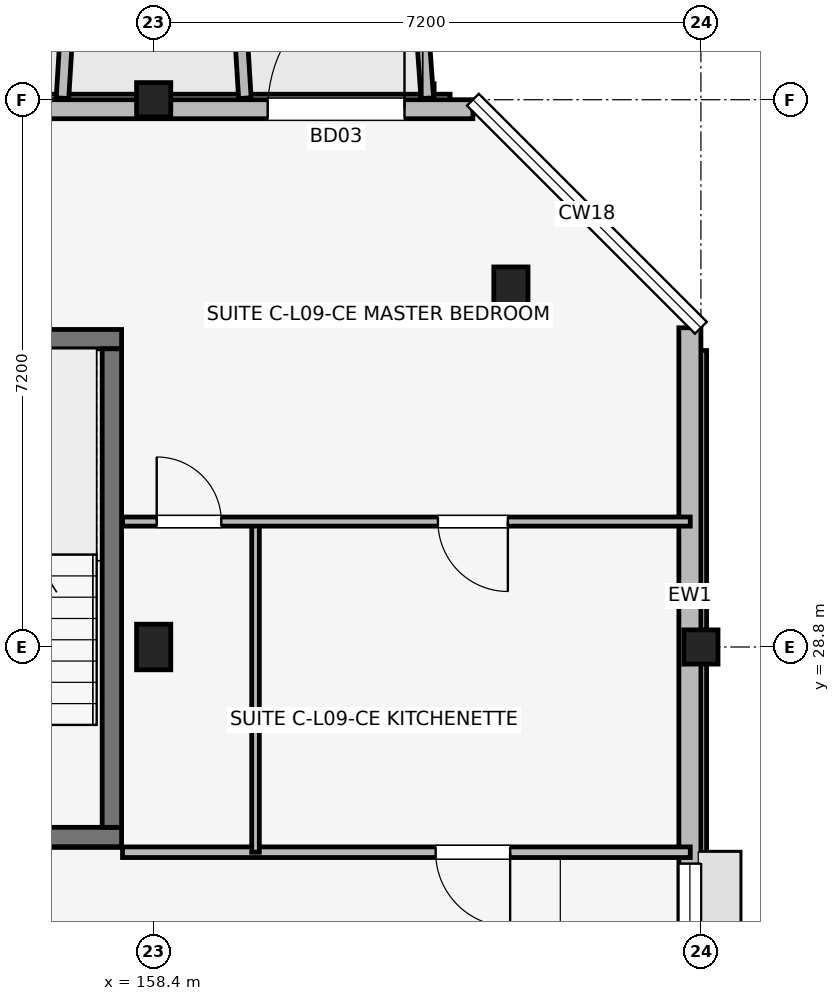
"""IFC4 building model, lengths in metres.
Left out: names, types, materials, properties, quantities, classifications, styles, units other than length and angle.
Written with IfcOpenShell. Run it as: python <this file> out.ifc"""

import sys

from ifc_helpers import new_model, si_unit, direction, frame, frame_2d, origin, origin_2d, place, context, subcontext, project, spatial, rectangle, extrude, element, fill, save


model = new_model("IFC4")
c1 = context("Model", 3, precision=1e-05, world=origin(), true_north=direction((0.0, 1.0)))
c2 = subcontext(c1, "Body", "Model", "MODEL_VIEW")
j1 = project(units=[si_unit("LENGTHUNIT", "METRE"), si_unit("PLANEANGLEUNIT", "RADIAN")], contexts=[c1])
p1 = place(None, origin())
s1 = spatial("IfcSite", under=j1, at=p1, CompositionType="ELEMENT")
p2 = place(p1, origin())
s2 = spatial("IfcBuilding", under=s1, at=p2, CompositionType="ELEMENT")
p3 = place(p2, frame((0.0, 0.0, 30.75)))
s3 = spatial("IfcBuildingStorey", under=s2, at=p3, CompositionType="ELEMENT", Elevation=30.75)
p4 = place(p3, frame((158.4, 28.8, 0.0), z_axis=(0.0, 0.0, 1.0), x_axis=(1.0, 0.0, 0.0)))
e1 = element("IfcColumn", 1, at=p4, inside=s3, PredefinedType="COLUMN", context=c2, shape_type="SweptSolid", body=[
    extrude(rectangle(XDim=0.45, YDim=0.6, at=origin_2d()), origin(), (0.0, 0.0, 1.0), 3.15),
])
for number, where, z_axis, x_axis in (
    (2, (158.4, 36.0, 0.0), (0.0, 0.0, 1.0), (1.0, 0.0, 0.0)),
    (3, (165.6, 28.8, 0.0), (0.0, 0.0, 1.0), (1.0, 0.0, 0.0)),
):
    element("IfcColumn", number, at=place(p3, frame(where, z_axis=z_axis, x_axis=x_axis)), inside=s3, PredefinedType="COLUMN", context=c2, shape_type="SweptSolid", body=[
        extrude(rectangle(XDim=0.45, YDim=0.45, at=origin_2d()), origin(), (0.0, 0.0, 1.0), 3.15),
    ])
p5 = place(p3, frame((163.1, 33.5, 0.0), z_axis=(0.0, 0.0, 1.0), x_axis=(1.0, 0.0, 0.0)))
e4 = element("IfcColumn", 4, at=p5, inside=s3, PredefinedType="COLUMN", context=c2, shape_type="SweptSolid", body=[
    extrude(rectangle(XDim=0.45, YDim=0.6, at=origin_2d()), origin(), (0.0, 0.0, 1.0), 3.15),
])
p6 = place(p3, frame((154.673, 26.3, 0.0), z_axis=(0.0, 0.0, 1.0), x_axis=(1.0, 0.0, 0.0)))
e5 = element("IfcWall", 5, at=p6, inside=s3, PredefinedType="SHEAR", context=c2, shape_type="SweptSolid", body=[
    extrude(rectangle(XDim=3.305, YDim=0.255, at=frame_2d((1.652, 0.0))), origin(), (0.0, 0.0, 1.0), 3.15),
])
p7 = place(p6, frame((1.127, 0.0, 0.0)))
e6 = element("IfcOpeningElement", 6, at=p7, cuts=e5, PredefinedType="OPENING", context=c2, shape_type="SweptSolid", body=[
    extrude(rectangle(XDim=1.05, YDim=2.12, at=frame_2d((0.525, 1.06))), frame((0.0, 0.137, 0.0), z_axis=(0.0, -1.0, 0.0), x_axis=(1.0, 0.0, 0.0)), (0.0, 0.0, 1.0), 0.275),
])
p8 = place(p3, frame((154.673, 32.85, 0.0), z_axis=(0.0, 0.0, 1.0), x_axis=(1.0, 0.0, 0.0)))
e7 = element("IfcWall", 7, at=p8, inside=s3, PredefinedType="SHEAR", context=c2, shape_type="SweptSolid", body=[
    extrude(rectangle(XDim=3.305, YDim=0.255, at=frame_2d((1.652, 0.0))), origin(), (0.0, 0.0, 1.0), 3.15),
])
p9 = place(p3, frame((157.85, 26.427, 0.0), z_axis=(0.0, 0.0, 1.0), x_axis=(0.0, 1.0, 0.0)))
e8 = element("IfcWall", 8, at=p9, inside=s3, PredefinedType="SHEAR", context=c2, shape_type="SweptSolid", body=[
    extrude(rectangle(XDim=6.295, YDim=0.255, at=frame_2d((3.147, 0.0))), origin(), (0.0, 0.0, 1.0), 3.15),
])
p10 = place(p3, frame((165.455, 17.4, 0.0), z_axis=(0.0, 0.0, 1.0), x_axis=(0.0, 1.0, 0.0)))
e9 = element("IfcWall", 9, at=p10, inside=s3, PredefinedType="SOLIDWALL", context=c2, shape_type="SweptSolid", body=[
    extrude(rectangle(XDim=15.6, YDim=0.29, at=frame_2d((7.8, 0.0))), origin(), (0.0, 0.0, 1.0), 2.48),
])
p11 = place(p10, frame((7.05, 0.0, 1.05)))
e10 = element("IfcOpeningElement", 10, at=p11, cuts=e9, PredefinedType="OPENING", context=c2, shape_type="SweptSolid", body=[
    extrude(rectangle(XDim=1.5, YDim=1.15, at=frame_2d((0.75, 0.575))), frame((0.0, 0.155, 0.0), z_axis=(0.0, -1.0, 0.0), x_axis=(1.0, 0.0, 0.0)), (0.0, 0.0, 1.0), 0.31),
])
p12 = place(p10, frame((1.363, 0.0, 0.75)))
e11 = element("IfcOpeningElement", 11, at=p12, cuts=e9, PredefinedType="OPENING", context=c2, shape_type="SweptSolid", body=[
    extrude(rectangle(XDim=1.42, YDim=1.6, at=frame_2d((0.71, 0.8))), frame((0.0, 0.155, 0.0), z_axis=(0.0, -1.0, 0.0), x_axis=(1.0, 0.0, 0.0)), (0.0, 0.0, 1.0), 0.31),
])
p13 = place(p3, frame((162.6, 35.875, 0.0), z_axis=(0.0, 0.0, 1.0), x_axis=(-1.0, 0.0, 0.0)))
e12 = element("IfcWall", 12, at=p13, inside=s3, PredefinedType="SOLIDWALL", context=c2, shape_type="SweptSolid", body=[
    extrude(rectangle(XDim=30.0, YDim=0.25, at=frame_2d((15.0, 0.0))), origin(), (0.0, 0.0, 1.0), 2.48),
])
p14 = place(p13, frame((29.025, 0.0, 0.0), z_axis=(0.0, 0.0, 1.0), x_axis=(-1.0, 0.0, 0.0)))
e13 = element("IfcOpeningElement", 13, at=p14, cuts=e12, PredefinedType="OPENING", context=c2, shape_type="SweptSolid", body=[
    extrude(rectangle(XDim=1.65, YDim=2.15, at=frame_2d((0.825, 1.075))), frame((0.0, 0.135, 0.0), z_axis=(0.0, -1.0, 0.0), x_axis=(1.0, 0.0, 0.0)), (0.0, 0.0, 1.0), 0.27),
])
p15 = place(p13, frame((2.7, 0.0, 0.0), z_axis=(0.0, 0.0, 1.0), x_axis=(-1.0, 0.0, 0.0)))
e14 = element("IfcOpeningElement", 14, at=p15, cuts=e12, PredefinedType="OPENING", context=c2, shape_type="SweptSolid", body=[
    extrude(rectangle(XDim=1.8, YDim=2.15, at=frame_2d((0.9, 1.075))), frame((0.0, 0.135, 0.0), z_axis=(0.0, -1.0, 0.0), x_axis=(1.0, 0.0, 0.0)), (0.0, 0.0, 1.0), 0.27),
])
p16 = place(p13, frame((15.43, 0.0, 0.5)))
e15 = element("IfcOpeningElement", 15, at=p16, cuts=e12, PredefinedType="OPENING", context=c2, shape_type="SweptSolid", body=[
    extrude(rectangle(XDim=0.75, YDim=1.75, at=frame_2d((0.375, 0.875))), frame((0.0, 0.135, 0.0), z_axis=(0.0, -1.0, 0.0), x_axis=(1.0, 0.0, 0.0)), (0.0, 0.0, 1.0), 0.27),
])
p17 = place(p13, frame((8.075, 0.0, 0.7)))
e16 = element("IfcOpeningElement", 16, at=p17, cuts=e12, PredefinedType="OPENING", context=c2, shape_type="SweptSolid", body=[
    extrude(rectangle(XDim=2.0, YDim=1.65, at=frame_2d((1.0, 0.825))), frame((0.0, 0.135, 0.0), z_axis=(0.0, -1.0, 0.0), x_axis=(1.0, 0.0, 0.0)), (0.0, 0.0, 1.0), 0.27),
])
p18 = place(p13, frame((19.97, 0.0, 0.7)))
e17 = element("IfcOpeningElement", 17, at=p18, cuts=e12, PredefinedType="OPENING", context=c2, shape_type="SweptSolid", body=[
    extrude(rectangle(XDim=1.86, YDim=1.6, at=frame_2d((0.93, 0.8))), frame((0.0, 0.135, 0.0), z_axis=(0.0, -1.0, 0.0), x_axis=(1.0, 0.0, 0.0)), (0.0, 0.0, 1.0), 0.27),
])
p19 = place(p3, frame((157.2, 36.02, 0.0), z_axis=(0.0, 0.0, 1.0), x_axis=(0.061170732449, 0.998127317276, 0.0)))
e18 = element("IfcWall", 18, at=p19, inside=s3, PredefinedType="ELEMENTEDWALL", context=c2, shape_type="SweptSolid", body=[
    extrude(rectangle(XDim=1.964, YDim=0.165, at=frame_2d((0.982, 0.0))), origin(), (0.0, 0.0, 1.0), 2.58),
])
p20 = place(p3, frame((159.6, 36.02, 0.0), z_axis=(0.0, 0.0, 1.0), x_axis=(-0.061170732449, 0.998127317276, 0.0)))
e19 = element("IfcWall", 19, at=p20, inside=s3, PredefinedType="ELEMENTEDWALL", context=c2, shape_type="SweptSolid", body=[
    extrude(rectangle(XDim=1.964, YDim=0.165, at=frame_2d((0.982, 0.0))), origin(), (0.0, 0.0, 1.0), 2.95),
])
p21 = place(p3, frame((162.0, 36.02, 0.0), z_axis=(0.0, 0.0, 1.0), x_axis=(-0.071194071069, 0.997462482625, 0.0)))
e20 = element("IfcWall", 20, at=p21, inside=s3, PredefinedType="ELEMENTEDWALL", context=c2, shape_type="SweptSolid", body=[
    extrude(rectangle(XDim=1.965, YDim=0.165, at=frame_2d((0.982, 0.0))), origin(), (0.0, 0.0, 1.0), 2.95),
])
p22 = place(p3, frame((157.99, 26.1, 0.0), z_axis=(0.0, 0.0, 1.0), x_axis=(1.0, 0.0, 0.0)))
e21 = element("IfcWall", 21, at=p22, inside=s3, PredefinedType="PARTITIONING", context=c2, shape_type="SweptSolid", body=[
    extrude(rectangle(XDim=7.47, YDim=0.14, at=frame_2d((3.735, 0.0))), origin(), (0.0, 0.0, 1.0), 2.38),
])
p23 = place(p22, frame((5.1, 0.0, 0.0), z_axis=(0.0, 0.0, 1.0), x_axis=(-1.0, 0.0, 0.0)))
e22 = element("IfcOpeningElement", 22, at=p23, cuts=e21, PredefinedType="OPENING", context=c2, shape_type="SweptSolid", body=[
    extrude(rectangle(XDim=0.98, YDim=2.1, at=frame_2d((0.49, 1.05))), frame((0.0, 0.08, 0.0), z_axis=(0.0, -1.0, 0.0), x_axis=(1.0, 0.0, 0.0)), (0.0, 0.0, 1.0), 0.16),
])
p24 = place(p3, frame((159.74, 26.1, 0.0), z_axis=(0.0, 0.0, 1.0), x_axis=(0.0, 1.0, 0.0)))
e23 = element("IfcWall", 23, at=p24, inside=s3, PredefinedType="PARTITIONING", context=c2, shape_type="SweptSolid", body=[
    extrude(rectangle(XDim=4.35, YDim=0.1, at=frame_2d((2.175, 0.0))), origin(), (0.0, 0.0, 1.0), 2.38),
])
p25 = place(p3, frame((157.99, 30.45, 0.0), z_axis=(0.0, 0.0, 1.0), x_axis=(1.0, 0.0, 0.0)))
e24 = element("IfcWall", 24, at=p25, inside=s3, PredefinedType="PARTITIONING", context=c2, shape_type="SweptSolid", body=[
    extrude(rectangle(XDim=7.47, YDim=0.12, at=frame_2d((3.735, 0.0))), origin(), (0.0, 0.0, 1.0), 2.38),
])
p26 = place(p25, frame((0.45, 0.0, 0.0)))
e25 = element("IfcOpeningElement", 25, at=p26, cuts=e24, PredefinedType="OPENING", context=c2, shape_type="SweptSolid", body=[
    extrude(rectangle(XDim=0.85, YDim=2.08, at=frame_2d((0.425, 1.04))), frame((0.0, 0.07, 0.0), z_axis=(0.0, -1.0, 0.0), x_axis=(1.0, 0.0, 0.0)), (0.0, 0.0, 1.0), 0.14),
])
p27 = place(p25, frame((5.07, 0.0, 0.0), z_axis=(0.0, 0.0, 1.0), x_axis=(-1.0, 0.0, 0.0)))
e26 = element("IfcOpeningElement", 26, at=p27, cuts=e24, PredefinedType="OPENING", context=c2, shape_type="SweptSolid", body=[
    extrude(rectangle(XDim=0.92, YDim=2.08, at=frame_2d((0.46, 1.04))), frame((0.0, 0.07, 0.0), z_axis=(0.0, -1.0, 0.0), x_axis=(1.0, 0.0, 0.0)), (0.0, 0.0, 1.0), 0.14),
])
p28 = place(p15, origin())
e27 = element("IfcDoor", 27, at=p28, inside=s3, OperationType="SINGLE_SWING_LEFT", PredefinedType="DOOR", context=c2, shape_type="SweptSolid", body=[
    extrude(rectangle(XDim=1.8, YDim=2.15, at=frame_2d((0.9, 1.075))), frame((0.0, 0.025, 0.0), z_axis=(0.0, -1.0, 0.0), x_axis=(1.0, 0.0, 0.0)), (0.0, 0.0, 1.0), 0.05),
])
fill(e14, e27)
p29 = place(p11, origin())
e28 = element("IfcWindow", 28, at=p29, inside=s3, PartitioningType="SINGLE_PANEL", PredefinedType="WINDOW", context=c2, shape_type="SweptSolid", body=[
    extrude(rectangle(XDim=1.5, YDim=1.15, at=frame_2d((0.75, 0.575))), frame((0.0, 0.03, 0.0), z_axis=(0.0, -1.0, 0.0), x_axis=(1.0, 0.0, 0.0)), (0.0, 0.0, 1.0), 0.06),
])
fill(e10, e28)
p30 = place(p23, origin())
e29 = element("IfcDoor", 29, at=p30, inside=s3, OperationType="SINGLE_SWING_RIGHT", PredefinedType="DOOR", context=c2, shape_type="SweptSolid", body=[
    extrude(rectangle(XDim=0.98, YDim=2.1, at=frame_2d((0.49, 1.05))), frame((0.0, 0.025, 0.0), z_axis=(0.0, -1.0, 0.0), x_axis=(1.0, 0.0, 0.0)), (0.0, 0.0, 1.0), 0.05),
])
fill(e22, e29)
p31 = place(p26, origin())
e30 = element("IfcDoor", 30, at=p31, inside=s3, OperationType="SINGLE_SWING_LEFT", PredefinedType="DOOR", context=c2, shape_type="SweptSolid", body=[
    extrude(rectangle(XDim=0.85, YDim=2.08, at=frame_2d((0.425, 1.04))), frame((0.0, 0.025, 0.0), z_axis=(0.0, -1.0, 0.0), x_axis=(1.0, 0.0, 0.0)), (0.0, 0.0, 1.0), 0.05),
])
fill(e25, e30)
p32 = place(p27, origin())
e31 = element("IfcDoor", 31, at=p32, inside=s3, OperationType="SINGLE_SWING_RIGHT", PredefinedType="DOOR", context=c2, shape_type="SweptSolid", body=[
    extrude(rectangle(XDim=0.92, YDim=2.08, at=frame_2d((0.46, 1.04))), frame((0.0, 0.025, 0.0), z_axis=(0.0, -1.0, 0.0), x_axis=(1.0, 0.0, 0.0)), (0.0, 0.0, 1.0), 0.05),
])
fill(e26, e31)
save(model, sys.argv[1])
